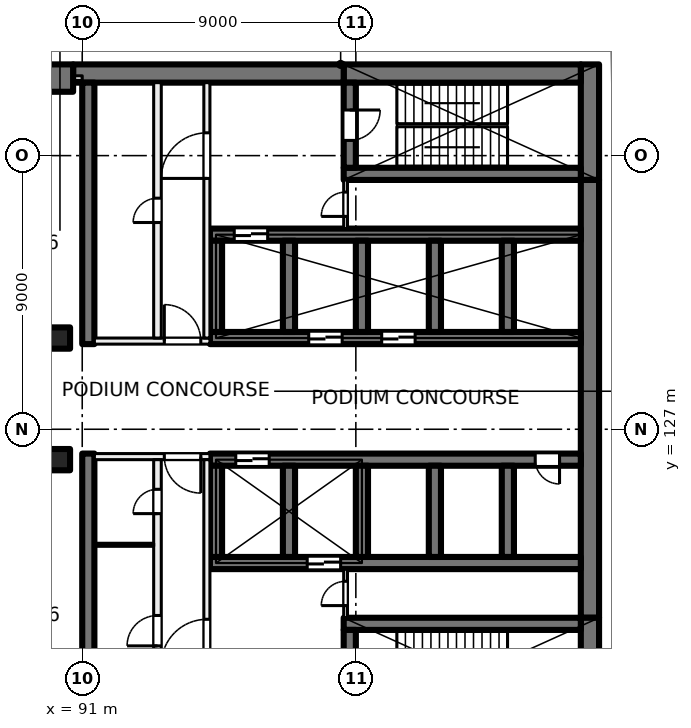
"""IFC4 building model, lengths in metres.
Left out: names, types, materials, properties, quantities, classifications, styles, units other than length and angle.
Written with IfcOpenShell. Run it as: python <this file> out.ifc"""

import sys

from ifc_helpers import new_model, si_unit, direction, frame, frame_2d, origin, origin_2d, place, context, subcontext, project, spatial, rectangle, extrude, element, fill, save


model = new_model("IFC4")
c1 = context("Model", 3, precision=1e-05, world=origin(), true_north=direction((0.0, 1.0)))
c2 = subcontext(c1, "Body", "Model", "MODEL_VIEW")
j1 = project(units=[si_unit("LENGTHUNIT", "METRE"), si_unit("PLANEANGLEUNIT", "RADIAN")], contexts=[c1])
p1 = place(None, origin())
s1 = spatial("IfcSite", under=j1, at=p1, CompositionType="ELEMENT")
p2 = place(p1, origin())
s2 = spatial("IfcBuilding", under=s1, at=p2, CompositionType="ELEMENT")
p3 = place(p2, frame((0.0, 0.0, 17.5)))
s3 = spatial("IfcBuildingStorey", under=s2, at=p3, CompositionType="ELEMENT", Elevation=17.5)
for number, where, z_axis, x_axis in (
    (1, (90.25, 130.0, 0.0), (0.0, 0.0, 1.0), (1.0, 0.0, 0.0)),
    (2, (90.25, 126.0, 0.0), (0.0, 0.0, 1.0), (1.0, 0.0, 0.0)),
):
    element("IfcColumn", number, at=place(p3, frame(where, z_axis=z_axis, x_axis=x_axis)), inside=s3, PredefinedType="COLUMN", context=c2, shape_type="SweptSolid", body=[
        extrude(rectangle(XDim=0.7, YDim=0.7, at=origin_2d()), origin(), (0.0, 0.0, 1.0), 5.0),
    ])
p4 = place(p3, frame((90.25, 138.55, 0.0), z_axis=(0.0, 0.0, 1.0), x_axis=(1.0, 0.0, 0.0)))
e3 = element("IfcColumn", 3, at=p4, inside=s3, PredefinedType="COLUMN", context=c2, shape_type="SweptSolid", body=[
    extrude(rectangle(XDim=0.9, YDim=0.9, at=origin_2d()), origin(), (0.0, 0.0, 1.0), 5.0),
])
p5 = place(p3, frame((107.7, 139.0, 0.0), z_axis=(0.0, 0.0, 1.0), x_axis=(0.0, -1.0, 0.0)))
e4 = element("IfcWall", 4, at=p5, inside=s3, PredefinedType="SHEAR", context=c2, shape_type="SweptSolid", body=[
    extrude(rectangle(XDim=3.8, YDim=0.6, at=frame_2d((1.9, 0.0))), origin(), (0.0, 0.0, 1.0), 5.0),
])
p6 = place(p3, frame((107.7, 135.2, 0.0), z_axis=(0.0, 0.0, 1.0), x_axis=(0.0, -1.0, 0.0)))
e5 = element("IfcWall", 5, at=p6, inside=s3, PredefinedType="SHEAR", context=c2, shape_type="SweptSolid", body=[
    extrude(rectangle(XDim=14.4, YDim=0.6, at=frame_2d((7.2, 0.0))), origin(), (0.0, 0.0, 1.0), 5.0),
])
p7 = place(p3, frame((107.7, 120.8, 0.0), z_axis=(0.0, 0.0, 1.0), x_axis=(0.0, -1.0, 0.0)))
e6 = element("IfcWall", 6, at=p7, inside=s3, PredefinedType="SHEAR", context=c2, shape_type="SweptSolid", body=[
    extrude(rectangle(XDim=3.8, YDim=0.6, at=frame_2d((1.9, 0.0))), origin(), (0.0, 0.0, 1.0), 5.0),
])
p8 = place(p3, frame((107.4, 138.7, 0.0), z_axis=(0.0, 0.0, 1.0), x_axis=(-1.0, 0.0, 0.0)))
e7 = element("IfcWall", 7, at=p8, inside=s3, PredefinedType="SHEAR", context=c2, shape_type="SweptSolid", body=[
    extrude(rectangle(XDim=7.8, YDim=0.6, at=frame_2d((3.9, 0.0))), origin(), (0.0, 0.0, 1.0), 5.0),
])
p9 = place(p3, frame((99.6, 138.7, 0.0), z_axis=(0.0, 0.0, 1.0), x_axis=(-1.0, 0.0, 0.0)))
e8 = element("IfcWall", 8, at=p9, inside=s3, PredefinedType="SHEAR", context=c2, shape_type="SweptSolid", body=[
    extrude(rectangle(XDim=8.9, YDim=0.6, at=frame_2d((4.45, 0.0))), origin(), (0.0, 0.0, 1.0), 5.0),
])
p10 = place(p3, frame((107.4, 135.4, 0.0), z_axis=(0.0, 0.0, 1.0), x_axis=(-1.0, 0.0, 0.0)))
e9 = element("IfcWall", 9, at=p10, inside=s3, PredefinedType="SHEAR", context=c2, shape_type="SweptSolid", body=[
    extrude(rectangle(XDim=7.8, YDim=0.4, at=frame_2d((3.9, 0.0))), origin(), (0.0, 0.0, 1.0), 5.0),
])
p11 = place(p3, frame((99.8, 138.4, 0.0), z_axis=(0.0, 0.0, 1.0), x_axis=(0.0, -1.0, 0.0)))
e10 = element("IfcWall", 10, at=p11, inside=s3, PredefinedType="SHEAR", context=c2, shape_type="SweptSolid", body=[
    extrude(rectangle(XDim=2.8, YDim=0.4, at=frame_2d((1.4, 0.0))), origin(), (0.0, 0.0, 1.0), 5.0),
])
p12 = place(p11, frame((0.9, 0.0, 0.0)))
e11 = element("IfcOpeningElement", 11, at=p12, cuts=e10, PredefinedType="OPENING", context=c2, shape_type="SweptSolid", body=[
    extrude(rectangle(XDim=1.0, YDim=2.1, at=frame_2d((0.5, 1.05))), frame((0.0, 0.21, 0.0), z_axis=(0.0, -1.0, 0.0), x_axis=(1.0, 0.0, 0.0)), (0.0, 0.0, 1.0), 0.42),
])
p13 = place(p3, frame((107.4, 120.6, 0.0), z_axis=(0.0, 0.0, 1.0), x_axis=(-1.0, 0.0, 0.0)))
e12 = element("IfcWall", 12, at=p13, inside=s3, PredefinedType="SHEAR", context=c2, shape_type="SweptSolid", body=[
    extrude(rectangle(XDim=7.8, YDim=0.4, at=frame_2d((3.9, 0.0))), origin(), (0.0, 0.0, 1.0), 5.0),
])
p14 = place(p3, frame((99.8, 120.4, 0.0), z_axis=(0.0, 0.0, 1.0), x_axis=(0.0, -1.0, 0.0)))
e13 = element("IfcWall", 13, at=p14, inside=s3, PredefinedType="SHEAR", context=c2, shape_type="SweptSolid", body=[
    extrude(rectangle(XDim=2.8, YDim=0.4, at=frame_2d((1.4, 0.0))), origin(), (0.0, 0.0, 1.0), 5.0),
])
p15 = place(p14, frame((0.9, 0.0, 0.0)))
e14 = element("IfcOpeningElement", 14, at=p15, cuts=e13, PredefinedType="OPENING", context=c2, shape_type="SweptSolid", body=[
    extrude(rectangle(XDim=1.0, YDim=2.1, at=frame_2d((0.5, 1.05))), frame((0.0, 0.21, 0.0), z_axis=(0.0, -1.0, 0.0), x_axis=(1.0, 0.0, 0.0)), (0.0, 0.0, 1.0), 0.42),
])
p16 = place(p3, frame((107.4, 130.0, 0.0), z_axis=(0.0, 0.0, 1.0), x_axis=(-1.0, 0.0, 0.0)))
e15 = element("IfcWall", 15, at=p16, inside=s3, PredefinedType="SHEAR", context=c2, shape_type="SweptSolid", body=[
    extrude(rectangle(XDim=12.2, YDim=0.4, at=frame_2d((6.1, 0.0))), origin(), (0.0, 0.0, 1.0), 5.0),
])
p17 = place(p16, frame((5.45, 0.0, 0.0)))
e16 = element("IfcOpeningElement", 16, at=p17, cuts=e15, PredefinedType="OPENING", context=c2, shape_type="SweptSolid", body=[
    extrude(rectangle(XDim=1.1, YDim=2.1, at=frame_2d((0.55, 1.05))), frame((0.0, 0.21, 0.0), z_axis=(0.0, -1.0, 0.0), x_axis=(1.0, 0.0, 0.0)), (0.0, 0.0, 1.0), 0.42),
])
p18 = place(p16, frame((7.85, 0.0, 0.0)))
e17 = element("IfcOpeningElement", 17, at=p18, cuts=e15, PredefinedType="OPENING", context=c2, shape_type="SweptSolid", body=[
    extrude(rectangle(XDim=1.1, YDim=2.1, at=frame_2d((0.55, 1.05))), frame((0.0, 0.21, 0.0), z_axis=(0.0, -1.0, 0.0), x_axis=(1.0, 0.0, 0.0)), (0.0, 0.0, 1.0), 0.42),
])
p19 = place(p3, frame((107.4, 133.4, 0.0), z_axis=(0.0, 0.0, 1.0), x_axis=(-1.0, 0.0, 0.0)))
e18 = element("IfcWall", 18, at=p19, inside=s3, PredefinedType="SHEAR", context=c2, shape_type="SweptSolid", body=[
    extrude(rectangle(XDim=12.2, YDim=0.4, at=frame_2d((6.1, 0.0))), origin(), (0.0, 0.0, 1.0), 5.0),
])
p20 = place(p19, frame((10.3, 0.0, 0.0)))
e19 = element("IfcOpeningElement", 19, at=p20, cuts=e18, PredefinedType="OPENING", context=c2, shape_type="SweptSolid", body=[
    extrude(rectangle(XDim=1.1, YDim=2.1, at=frame_2d((0.55, 1.05))), frame((0.0, 0.21, 0.0), z_axis=(0.0, -1.0, 0.0), x_axis=(1.0, 0.0, 0.0)), (0.0, 0.0, 1.0), 0.42),
])
for number, where, z_axis, x_axis in (
    (20, (105.0, 133.2, 0.0), (0.0, 0.0, 1.0), (0.0, -1.0, 0.0)),
    (21, (102.6, 133.2, 0.0), (0.0, 0.0, 1.0), (0.0, -1.0, 0.0)),
    (22, (100.2, 133.2, 0.0), (0.0, 0.0, 1.0), (0.0, -1.0, 0.0)),
    (23, (97.8, 133.2, 0.0), (0.0, 0.0, 1.0), (0.0, -1.0, 0.0)),
    (24, (95.4, 133.2, 0.0), (0.0, 0.0, 1.0), (0.0, -1.0, 0.0)),
):
    element("IfcWall", number, at=place(p3, frame(where, z_axis=z_axis, x_axis=x_axis)), inside=s3, PredefinedType="SHEAR", context=c2, shape_type="SweptSolid", body=[
        extrude(rectangle(XDim=3.0, YDim=0.4, at=frame_2d((1.5, 0.0))), origin(), (0.0, 0.0, 1.0), 5.0),
    ])
p21 = place(p3, frame((107.4, 126.0, 0.0), z_axis=(0.0, 0.0, 1.0), x_axis=(-1.0, 0.0, 0.0)))
e25 = element("IfcWall", 25, at=p21, inside=s3, PredefinedType="SHEAR", context=c2, shape_type="SweptSolid", body=[
    extrude(rectangle(XDim=12.2, YDim=0.4, at=frame_2d((6.1, 0.0))), origin(), (0.0, 0.0, 1.0), 5.0),
])
p22 = place(p21, frame((10.25, 0.0, 0.0)))
e26 = element("IfcOpeningElement", 26, at=p22, cuts=e25, PredefinedType="OPENING", context=c2, shape_type="SweptSolid", body=[
    extrude(rectangle(XDim=1.1, YDim=2.1, at=frame_2d((0.55, 1.05))), frame((0.0, 0.21, 0.0), z_axis=(0.0, -1.0, 0.0), x_axis=(1.0, 0.0, 0.0)), (0.0, 0.0, 1.0), 0.42),
])
p23 = place(p21, frame((0.7, 0.0, 0.0)))
e27 = element("IfcOpeningElement", 27, at=p23, cuts=e25, PredefinedType="OPENING", context=c2, shape_type="SweptSolid", body=[
    extrude(rectangle(XDim=0.8, YDim=2.1, at=frame_2d((0.4, 1.05))), frame((0.0, 0.21, 0.0), z_axis=(0.0, -1.0, 0.0), x_axis=(1.0, 0.0, 0.0)), (0.0, 0.0, 1.0), 0.42),
])
p24 = place(p3, frame((107.4, 122.6, 0.0), z_axis=(0.0, 0.0, 1.0), x_axis=(-1.0, 0.0, 0.0)))
e28 = element("IfcWall", 28, at=p24, inside=s3, PredefinedType="SHEAR", context=c2, shape_type="SweptSolid", body=[
    extrude(rectangle(XDim=12.2, YDim=0.4, at=frame_2d((6.1, 0.0))), origin(), (0.0, 0.0, 1.0), 5.0),
])
p25 = place(p24, frame((7.9, 0.0, 0.0)))
e29 = element("IfcOpeningElement", 29, at=p25, cuts=e28, PredefinedType="OPENING", context=c2, shape_type="SweptSolid", body=[
    extrude(rectangle(XDim=1.1, YDim=2.1, at=frame_2d((0.55, 1.05))), frame((0.0, 0.21, 0.0), z_axis=(0.0, -1.0, 0.0), x_axis=(1.0, 0.0, 0.0)), (0.0, 0.0, 1.0), 0.42),
])
for number, where, z_axis, x_axis in (
    (30, (105.0, 125.8, 0.0), (0.0, 0.0, 1.0), (0.0, -1.0, 0.0)),
    (31, (102.6, 125.8, 0.0), (0.0, 0.0, 1.0), (0.0, -1.0, 0.0)),
    (32, (100.2, 125.8, 0.0), (0.0, 0.0, 1.0), (0.0, -1.0, 0.0)),
    (33, (97.8, 125.8, 0.0), (0.0, 0.0, 1.0), (0.0, -1.0, 0.0)),
    (34, (95.4, 125.8, 0.0), (0.0, 0.0, 1.0), (0.0, -1.0, 0.0)),
):
    element("IfcWall", number, at=place(p3, frame(where, z_axis=z_axis, x_axis=x_axis)), inside=s3, PredefinedType="SHEAR", context=c2, shape_type="SweptSolid", body=[
        extrude(rectangle(XDim=3.0, YDim=0.4, at=frame_2d((1.5, 0.0))), origin(), (0.0, 0.0, 1.0), 5.0),
    ])
for number, where, z_axis, x_axis in (
    (35, (91.2, 138.4, 0.0), (0.0, 0.0, 1.0), (0.0, -1.0, 0.0)),
    (36, (91.2, 126.2, 0.0), (0.0, 0.0, 1.0), (0.0, -1.0, 0.0)),
):
    element("IfcWall", number, at=place(p3, frame(where, z_axis=z_axis, x_axis=x_axis)), inside=s3, PredefinedType="SHEAR", context=c2, shape_type="SweptSolid", body=[
        extrude(rectangle(XDim=8.6, YDim=0.4, at=frame_2d((4.3, 0.0))), origin(), (0.0, 0.0, 1.0), 5.0),
    ])
p26 = place(p3, frame((95.2, 126.1, 0.0), z_axis=(0.0, 0.0, 1.0), x_axis=(-1.0, 0.0, 0.0)))
e37 = element("IfcWall", 37, at=p26, inside=s3, PredefinedType="PARTITIONING", context=c2, shape_type="SweptSolid", body=[
    extrude(rectangle(XDim=3.8, YDim=0.2, at=frame_2d((1.9, 0.0))), origin(), (0.0, 0.0, 1.0), 4.6),
])
p27 = place(p26, frame((0.3, 0.0, 0.0)))
e38 = element("IfcOpeningElement", 38, at=p27, cuts=e37, PredefinedType="OPENING", context=c2, shape_type="SweptSolid", body=[
    extrude(rectangle(XDim=1.2, YDim=2.1, at=frame_2d((0.6, 1.05))), frame((0.0, 0.11, 0.0), z_axis=(0.0, -1.0, 0.0), x_axis=(1.0, 0.0, 0.0)), (0.0, 0.0, 1.0), 0.22),
])
p28 = place(p3, frame((95.1, 117.6, 0.0), z_axis=(0.0, 0.0, 1.0), x_axis=(0.0, 1.0, 0.0)))
e39 = element("IfcWall", 39, at=p28, inside=s3, PredefinedType="PARTITIONING", context=c2, shape_type="SweptSolid", body=[
    extrude(rectangle(XDim=8.4, YDim=0.2, at=frame_2d((4.2, 0.0))), origin(), (0.0, 0.0, 1.0), 4.6),
])
p29 = place(p28, frame((1.65, 0.0, 0.0)))
e40 = element("IfcOpeningElement", 40, at=p29, cuts=e39, PredefinedType="OPENING", context=c2, shape_type="SweptSolid", body=[
    extrude(rectangle(XDim=1.5, YDim=2.1, at=frame_2d((0.75, 1.05))), frame((0.0, 0.11, 0.0), z_axis=(0.0, -1.0, 0.0), x_axis=(1.0, 0.0, 0.0)), (0.0, 0.0, 1.0), 0.22),
])
p30 = place(p3, frame((93.475, 117.6, 0.0), z_axis=(0.0, 0.0, 1.0), x_axis=(0.0, 1.0, 0.0)))
e41 = element("IfcWall", 41, at=p30, inside=s3, PredefinedType="PARTITIONING", context=c2, shape_type="SweptSolid", body=[
    extrude(rectangle(XDim=8.4, YDim=0.25, at=frame_2d((4.2, 0.0))), origin(), (0.0, 0.0, 1.0), 4.6),
])
p31 = place(p30, frame((6.625, 0.0, 0.0)))
e42 = element("IfcOpeningElement", 42, at=p31, cuts=e41, PredefinedType="OPENING", context=c2, shape_type="SweptSolid", body=[
    extrude(rectangle(XDim=0.8, YDim=2.1, at=frame_2d((0.4, 1.05))), frame((0.0, 0.135, 0.0), z_axis=(0.0, -1.0, 0.0), x_axis=(1.0, 0.0, 0.0)), (0.0, 0.0, 1.0), 0.27),
])
p32 = place(p30, frame((2.275, 0.0, 0.0)))
e43 = element("IfcOpeningElement", 43, at=p32, cuts=e41, PredefinedType="OPENING", context=c2, shape_type="SweptSolid", body=[
    extrude(rectangle(XDim=1.0, YDim=2.1, at=frame_2d((0.5, 1.05))), frame((0.0, 0.135, 0.0), z_axis=(0.0, -1.0, 0.0), x_axis=(1.0, 0.0, 0.0)), (0.0, 0.0, 1.0), 0.27),
])
p33 = place(p3, frame((99.663, 120.8, 0.0), z_axis=(0.0, 0.0, 1.0), x_axis=(0.0, 1.0, 0.0)))
e44 = element("IfcWall", 44, at=p33, inside=s3, PredefinedType="PARTITIONING", context=c2, shape_type="SweptSolid", body=[
    extrude(rectangle(XDim=1.6, YDim=0.125, at=frame_2d((0.8, 0.0))), origin(), (0.0, 0.0, 1.0), 4.6),
])
p34 = place(p33, frame((0.4, 0.0, 0.0)))
e45 = element("IfcOpeningElement", 45, at=p34, cuts=e44, PredefinedType="OPENING", context=c2, shape_type="SweptSolid", body=[
    extrude(rectangle(XDim=0.8, YDim=2.1, at=frame_2d((0.4, 1.05))), frame((0.0, 0.073, 0.0), z_axis=(0.0, -1.0, 0.0), x_axis=(1.0, 0.0, 0.0)), (0.0, 0.0, 1.0), 0.145),
])
p35 = place(p3, frame((93.35, 123.2, 0.0), z_axis=(0.0, 0.0, 1.0), x_axis=(-1.0, 0.0, 0.0)))
e46 = element("IfcWall", 46, at=p35, inside=s3, PredefinedType="PARTITIONING", context=c2, shape_type="SweptSolid", body=[
    extrude(rectangle(XDim=1.95, YDim=0.1, at=frame_2d((0.975, 0.0))), origin(), (0.0, 0.0, 1.0), 4.6),
])
p36 = place(p3, frame((91.4, 129.9, 0.0), z_axis=(0.0, 0.0, 1.0), x_axis=(1.0, 0.0, 0.0)))
e47 = element("IfcWall", 47, at=p36, inside=s3, PredefinedType="PARTITIONING", context=c2, shape_type="SweptSolid", body=[
    extrude(rectangle(XDim=3.8, YDim=0.2, at=frame_2d((1.9, 0.0))), origin(), (0.0, 0.0, 1.0), 4.6),
])
p37 = place(p36, frame((2.3, 0.0, 0.0)))
e48 = element("IfcOpeningElement", 48, at=p37, cuts=e47, PredefinedType="OPENING", context=c2, shape_type="SweptSolid", body=[
    extrude(rectangle(XDim=1.2, YDim=2.1, at=frame_2d((0.6, 1.05))), frame((0.0, 0.11, 0.0), z_axis=(0.0, -1.0, 0.0), x_axis=(1.0, 0.0, 0.0)), (0.0, 0.0, 1.0), 0.22),
])
p38 = place(p3, frame((95.1, 130.0, 0.0), z_axis=(0.0, 0.0, 1.0), x_axis=(0.0, 1.0, 0.0)))
e49 = element("IfcWall", 49, at=p38, inside=s3, PredefinedType="PARTITIONING", context=c2, shape_type="SweptSolid", body=[
    extrude(rectangle(XDim=8.4, YDim=0.2, at=frame_2d((4.2, 0.0))), origin(), (0.0, 0.0, 1.0), 4.6),
])
p39 = place(p38, frame((5.25, 0.0, 0.0)))
e50 = element("IfcOpeningElement", 50, at=p39, cuts=e49, PredefinedType="OPENING", context=c2, shape_type="SweptSolid", body=[
    extrude(rectangle(XDim=1.5, YDim=2.1, at=frame_2d((0.75, 1.05))), frame((0.0, 0.11, 0.0), z_axis=(0.0, -1.0, 0.0), x_axis=(1.0, 0.0, 0.0)), (0.0, 0.0, 1.0), 0.22),
])
p40 = place(p3, frame((93.475, 130.0, 0.0), z_axis=(0.0, 0.0, 1.0), x_axis=(0.0, 1.0, 0.0)))
e51 = element("IfcWall", 51, at=p40, inside=s3, PredefinedType="PARTITIONING", context=c2, shape_type="SweptSolid", body=[
    extrude(rectangle(XDim=8.4, YDim=0.25, at=frame_2d((4.2, 0.0))), origin(), (0.0, 0.0, 1.0), 4.6),
])
p41 = place(p40, frame((3.8, 0.0, 0.0)))
e52 = element("IfcOpeningElement", 52, at=p41, cuts=e51, PredefinedType="OPENING", context=c2, shape_type="SweptSolid", body=[
    extrude(rectangle(XDim=0.8, YDim=2.1, at=frame_2d((0.4, 1.05))), frame((0.0, 0.135, 0.0), z_axis=(0.0, -1.0, 0.0), x_axis=(1.0, 0.0, 0.0)), (0.0, 0.0, 1.0), 0.27),
])
p42 = place(p3, frame((99.663, 133.6, 0.0), z_axis=(0.0, 0.0, 1.0), x_axis=(0.0, 1.0, 0.0)))
e53 = element("IfcWall", 53, at=p42, inside=s3, PredefinedType="PARTITIONING", context=c2, shape_type="SweptSolid", body=[
    extrude(rectangle(XDim=1.6, YDim=0.125, at=frame_2d((0.8, 0.0))), origin(), (0.0, 0.0, 1.0), 4.6),
])
p43 = place(p42, frame((0.4, 0.0, 0.0)))
e54 = element("IfcOpeningElement", 54, at=p43, cuts=e53, PredefinedType="OPENING", context=c2, shape_type="SweptSolid", body=[
    extrude(rectangle(XDim=0.8, YDim=2.1, at=frame_2d((0.4, 1.05))), frame((0.0, 0.073, 0.0), z_axis=(0.0, -1.0, 0.0), x_axis=(1.0, 0.0, 0.0)), (0.0, 0.0, 1.0), 0.145),
])
p44 = place(p3, frame((49.825, 138.55, 0.0), z_axis=(0.0, 0.0, 1.0), x_axis=(1.0, 0.0, 0.0)))
e55 = element("IfcWall", 55, at=p44, inside=s3, PredefinedType="PARTITIONING", context=c2, shape_type="SweptSolid", body=[
    extrude(rectangle(XDim=41.175, YDim=0.15, at=frame_2d((20.587, 0.0))), origin(), (0.0, 0.0, 1.0), 4.6),
])
p45 = place(p44, frame((37.775, 0.0, 0.0)))
e56 = element("IfcOpeningElement", 56, at=p45, cuts=e55, PredefinedType="OPENING", context=c2, shape_type="SweptSolid", body=[
    extrude(rectangle(XDim=1.8, YDim=2.1, at=frame_2d((0.9, 1.05))), frame((0.0, 0.085, 0.0), z_axis=(0.0, -1.0, 0.0), x_axis=(1.0, 0.0, 0.0)), (0.0, 0.0, 1.0), 0.17),
])
p46 = place(p22, origin())
e57 = element("IfcDoor", 57, at=p46, inside=s3, OperationType="DOUBLE_DOOR_SLIDING", PredefinedType="DOOR", context=c2, shape_type="SweptSolid", body=[
    extrude(rectangle(XDim=1.1, YDim=2.1, at=frame_2d((0.55, 1.05))), frame((0.0, 0.025, 0.0), z_axis=(0.0, -1.0, 0.0), x_axis=(1.0, 0.0, 0.0)), (0.0, 0.0, 1.0), 0.05),
])
fill(e26, e57)
p47 = place(p17, origin())
e58 = element("IfcDoor", 58, at=p47, inside=s3, OperationType="DOUBLE_DOOR_SLIDING", PredefinedType="DOOR", context=c2, shape_type="SweptSolid", body=[
    extrude(rectangle(XDim=1.1, YDim=2.1, at=frame_2d((0.55, 1.05))), frame((0.0, 0.025, 0.0), z_axis=(0.0, -1.0, 0.0), x_axis=(1.0, 0.0, 0.0)), (0.0, 0.0, 1.0), 0.05),
])
fill(e16, e58)
p48 = place(p18, origin())
e59 = element("IfcDoor", 59, at=p48, inside=s3, OperationType="DOUBLE_DOOR_SLIDING", PredefinedType="DOOR", context=c2, shape_type="SweptSolid", body=[
    extrude(rectangle(XDim=1.1, YDim=2.1, at=frame_2d((0.55, 1.05))), frame((0.0, 0.025, 0.0), z_axis=(0.0, -1.0, 0.0), x_axis=(1.0, 0.0, 0.0)), (0.0, 0.0, 1.0), 0.05),
])
fill(e17, e59)
p49 = place(p23, origin())
e60 = element("IfcDoor", 60, at=p49, inside=s3, OperationType="SINGLE_SWING_LEFT", PredefinedType="DOOR", context=c2, shape_type="SweptSolid", body=[
    extrude(rectangle(XDim=0.8, YDim=2.1, at=frame_2d((0.4, 1.05))), frame((0.0, 0.025, 0.0), z_axis=(0.0, -1.0, 0.0), x_axis=(1.0, 0.0, 0.0)), (0.0, 0.0, 1.0), 0.05),
])
fill(e27, e60)
p50 = place(p27, origin())
e61 = element("IfcDoor", 61, at=p50, inside=s3, OperationType="DOUBLE_DOOR_SINGLE_SWING", PredefinedType="DOOR", context=c2, shape_type="SweptSolid", body=[
    extrude(rectangle(XDim=1.2, YDim=2.1, at=frame_2d((0.6, 1.05))), frame((0.0, 0.025, 0.0), z_axis=(0.0, -1.0, 0.0), x_axis=(1.0, 0.0, 0.0)), (0.0, 0.0, 1.0), 0.05),
])
fill(e38, e61)
p51 = place(p29, origin())
e62 = element("IfcDoor", 62, at=p51, inside=s3, OperationType="DOUBLE_DOOR_SINGLE_SWING", PredefinedType="DOOR", context=c2, shape_type="SweptSolid", body=[
    extrude(rectangle(XDim=1.5, YDim=2.1, at=frame_2d((0.75, 1.05))), frame((0.0, 0.025, 0.0), z_axis=(0.0, -1.0, 0.0), x_axis=(1.0, 0.0, 0.0)), (0.0, 0.0, 1.0), 0.05),
])
fill(e40, e62)
p52 = place(p34, origin())
e63 = element("IfcDoor", 63, at=p52, inside=s3, OperationType="SINGLE_SWING_RIGHT", PredefinedType="DOOR", context=c2, shape_type="SweptSolid", body=[
    extrude(rectangle(XDim=0.8, YDim=2.1, at=frame_2d((0.4, 1.05))), frame((0.0, 0.025, 0.0), z_axis=(0.0, -1.0, 0.0), x_axis=(1.0, 0.0, 0.0)), (0.0, 0.0, 1.0), 0.05),
])
fill(e45, e63)
p53 = place(p31, origin())
e64 = element("IfcDoor", 64, at=p53, inside=s3, OperationType="SINGLE_SWING_LEFT", PredefinedType="DOOR", context=c2, shape_type="SweptSolid", body=[
    extrude(rectangle(XDim=0.8, YDim=2.1, at=frame_2d((0.4, 1.05))), frame((0.0, 0.025, 0.0), z_axis=(0.0, -1.0, 0.0), x_axis=(1.0, 0.0, 0.0)), (0.0, 0.0, 1.0), 0.05),
])
fill(e42, e64)
p54 = place(p32, origin())
e65 = element("IfcDoor", 65, at=p54, inside=s3, OperationType="SINGLE_SWING_RIGHT", PredefinedType="DOOR", context=c2, shape_type="SweptSolid", body=[
    extrude(rectangle(XDim=1.0, YDim=2.1, at=frame_2d((0.5, 1.05))), frame((0.0, 0.025, 0.0), z_axis=(0.0, -1.0, 0.0), x_axis=(1.0, 0.0, 0.0)), (0.0, 0.0, 1.0), 0.05),
])
fill(e43, e65)
p55 = place(p37, origin())
e66 = element("IfcDoor", 66, at=p55, inside=s3, OperationType="DOUBLE_DOOR_SINGLE_SWING", PredefinedType="DOOR", context=c2, shape_type="SweptSolid", body=[
    extrude(rectangle(XDim=1.2, YDim=2.1, at=frame_2d((0.6, 1.05))), frame((0.0, 0.025, 0.0), z_axis=(0.0, -1.0, 0.0), x_axis=(1.0, 0.0, 0.0)), (0.0, 0.0, 1.0), 0.05),
])
fill(e48, e66)
p56 = place(p39, origin())
e67 = element("IfcDoor", 67, at=p56, inside=s3, OperationType="DOUBLE_DOOR_SINGLE_SWING", PredefinedType="DOOR", context=c2, shape_type="SweptSolid", body=[
    extrude(rectangle(XDim=1.5, YDim=2.1, at=frame_2d((0.75, 1.05))), frame((0.0, 0.025, 0.0), z_axis=(0.0, -1.0, 0.0), x_axis=(1.0, 0.0, 0.0)), (0.0, 0.0, 1.0), 0.05),
])
fill(e50, e67)
p57 = place(p12, origin())
e68 = element("IfcDoor", 68, at=p57, inside=s3, OperationType="SINGLE_SWING_RIGHT", PredefinedType="DOOR", context=c2, shape_type="SweptSolid", body=[
    extrude(rectangle(XDim=1.0, YDim=2.1, at=frame_2d((0.5, 1.05))), frame((0.0, 0.025, 0.0), z_axis=(0.0, -1.0, 0.0), x_axis=(1.0, 0.0, 0.0)), (0.0, 0.0, 1.0), 0.05),
])
fill(e11, e68)
p58 = place(p43, origin())
e69 = element("IfcDoor", 69, at=p58, inside=s3, OperationType="SINGLE_SWING_LEFT", PredefinedType="DOOR", context=c2, shape_type="SweptSolid", body=[
    extrude(rectangle(XDim=0.8, YDim=2.1, at=frame_2d((0.4, 1.05))), frame((0.0, 0.025, 0.0), z_axis=(0.0, -1.0, 0.0), x_axis=(1.0, 0.0, 0.0)), (0.0, 0.0, 1.0), 0.05),
])
fill(e54, e69)
p59 = place(p41, origin())
e70 = element("IfcDoor", 70, at=p59, inside=s3, OperationType="SINGLE_SWING_RIGHT", PredefinedType="DOOR", context=c2, shape_type="SweptSolid", body=[
    extrude(rectangle(XDim=0.8, YDim=2.1, at=frame_2d((0.4, 1.05))), frame((0.0, 0.025, 0.0), z_axis=(0.0, -1.0, 0.0), x_axis=(1.0, 0.0, 0.0)), (0.0, 0.0, 1.0), 0.05),
])
fill(e52, e70)
p60 = place(p20, origin())
e71 = element("IfcDoor", 71, at=p60, inside=s3, OperationType="DOUBLE_DOOR_SLIDING", PredefinedType="DOOR", context=c2, shape_type="SweptSolid", body=[
    extrude(rectangle(XDim=1.1, YDim=2.1, at=frame_2d((0.55, 1.05))), frame((0.0, 0.025, 0.0), z_axis=(0.0, -1.0, 0.0), x_axis=(1.0, 0.0, 0.0)), (0.0, 0.0, 1.0), 0.05),
])
fill(e19, e71)
p61 = place(p25, origin())
e72 = element("IfcDoor", 72, at=p61, inside=s3, OperationType="DOUBLE_DOOR_SLIDING", PredefinedType="DOOR", context=c2, shape_type="SweptSolid", body=[
    extrude(rectangle(XDim=1.1, YDim=2.1, at=frame_2d((0.55, 1.05))), frame((0.0, 0.025, 0.0), z_axis=(0.0, -1.0, 0.0), x_axis=(1.0, 0.0, 0.0)), (0.0, 0.0, 1.0), 0.05),
])
fill(e29, e72)
save(model, sys.argv[1])
